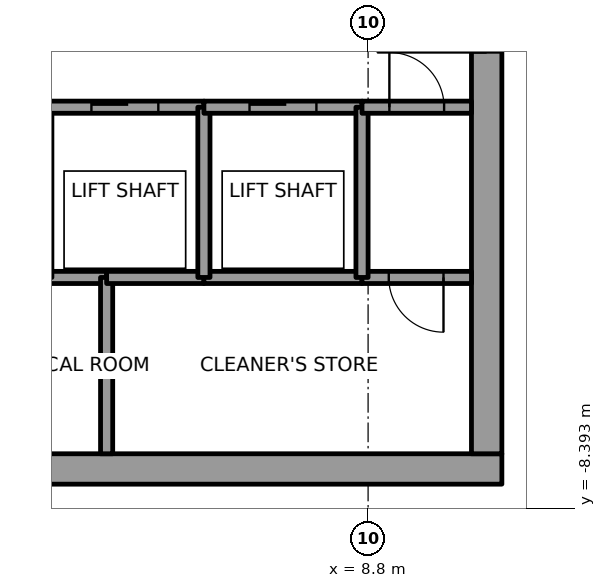
"""IFC4 building model, lengths in metres.
Left out: names, types, materials, properties, quantities, classifications, styles, units other than length and angle.
Written with IfcOpenShell. Run it as: python <this file> out.ifc"""

import sys

from ifc_helpers import new_model, si_unit, direction, frame, frame_2d, origin, place, context, subcontext, project, spatial, rectangle, extrude, element, fill, save


model = new_model("IFC4")
c1 = context("Model", 3, precision=1e-05, world=origin(), true_north=direction((0.0, 1.0)))
c2 = subcontext(c1, "Body", "Model", "MODEL_VIEW")
j1 = project(units=[si_unit("LENGTHUNIT", "METRE"), si_unit("PLANEANGLEUNIT", "RADIAN")], contexts=[c1])
p1 = place(None, origin())
s1 = spatial("IfcSite", under=j1, at=p1, CompositionType="ELEMENT")
p2 = place(p1, origin())
s2 = spatial("IfcBuilding", under=s1, at=p2, CompositionType="ELEMENT")
p3 = place(p2, frame((0.0, 0.0, 279.0)))
s3 = spatial("IfcBuildingStorey", under=s2, at=p3, CompositionType="ELEMENT", Elevation=279.0)
p4 = place(p3, frame((-11.0, -7.75, 0.0), z_axis=(0.0, 0.0, 1.0), x_axis=(1.0, 0.0, 0.0)))
e1 = element("IfcWall", 1, at=p4, inside=s3, PredefinedType="SHEAR", context=c2, shape_type="SweptSolid", body=[
    extrude(rectangle(XDim=22.0, YDim=0.5, at=frame_2d((11.0, 0.0))), origin(), (0.0, 0.0, 1.0), 4.0),
])
p5 = place(p4, frame((10.45, 0.0, 0.0)))
e2 = element("IfcOpeningElement", 2, at=p5, cuts=e1, PredefinedType="OPENING", context=c2, shape_type="SweptSolid", body=[
    extrude(rectangle(XDim=1.1, YDim=2.1, at=frame_2d((0.55, 1.05))), frame((0.0, 0.25, 0.0), z_axis=(0.0, -1.0, 0.0), x_axis=(1.0, 0.0, 0.0)), (0.0, 0.0, 1.0), 0.5),
])
p6 = place(p3, frame((10.75, -7.5, 0.0), z_axis=(0.0, 0.0, 1.0), x_axis=(0.0, 1.0, 0.0)))
e3 = element("IfcWall", 3, at=p6, inside=s3, PredefinedType="SHEAR", context=c2, shape_type="SweptSolid", body=[
    extrude(rectangle(XDim=15.0, YDim=0.5, at=frame_2d((7.5, 0.0))), origin(), (0.0, 0.0, 1.0), 4.0),
])
p7 = place(p6, frame((6.6, 0.0, 0.0)))
e4 = element("IfcOpeningElement", 4, at=p7, cuts=e3, PredefinedType="OPENING", context=c2, shape_type="SweptSolid", body=[
    extrude(rectangle(XDim=1.8, YDim=2.1, at=frame_2d((0.9, 1.05))), frame((0.0, 0.25, 0.0), z_axis=(0.0, -1.0, 0.0), x_axis=(1.0, 0.0, 0.0)), (0.0, 0.0, 1.0), 0.5),
])
p8 = place(p3, frame((4.5, -4.6, 0.0), z_axis=(0.0, 0.0, 1.0), x_axis=(-1.0, 0.0, 0.0)))
e5 = element("IfcWall", 5, at=p8, inside=s3, PredefinedType="SOLIDWALL", context=c2, shape_type="SweptSolid", body=[
    extrude(rectangle(XDim=1.0, YDim=0.2, at=frame_2d((0.5, 0.0))), origin(), (0.0, 0.0, 1.0), 3.85),
])
p9 = place(p3, frame((3.5, -1.8, 0.0), z_axis=(0.0, 0.0, 1.0), x_axis=(1.0, 0.0, 0.0)))
e6 = element("IfcWall", 6, at=p9, inside=s3, PredefinedType="SOLIDWALL", context=c2, shape_type="SweptSolid", body=[
    extrude(rectangle(XDim=2.6, YDim=0.2, at=frame_2d((1.3, 0.0))), origin(), (0.0, 0.0, 1.0), 3.85),
])
p10 = place(p9, frame((0.75, 0.0, 0.0)))
e7 = element("IfcOpeningElement", 7, at=p10, cuts=e6, PredefinedType="OPENING", context=c2, shape_type="SweptSolid", body=[
    extrude(rectangle(XDim=1.1, YDim=2.1, at=frame_2d((0.55, 1.05))), frame((0.0, 0.1, 0.0), z_axis=(0.0, -1.0, 0.0), x_axis=(1.0, 0.0, 0.0)), (0.0, 0.0, 1.0), 0.2),
])
p11 = place(p3, frame((4.5, -4.6, 0.0), z_axis=(0.0, 0.0, 1.0), x_axis=(0.0, -1.0, 0.0)))
e8 = element("IfcWall", 8, at=p11, inside=s3, PredefinedType="SOLIDWALL", context=c2, shape_type="SweptSolid", body=[
    extrude(rectangle(XDim=2.9, YDim=0.2, at=frame_2d((1.45, 0.0))), origin(), (0.0, 0.0, 1.0), 3.85),
])
p12 = place(p3, frame((6.1, -4.6, 0.0), z_axis=(0.0, 0.0, 1.0), x_axis=(-1.0, 0.0, 0.0)))
e9 = element("IfcWall", 9, at=p12, inside=s3, PredefinedType="SOLIDWALL", context=c2, shape_type="SweptSolid", body=[
    extrude(rectangle(XDim=1.6, YDim=0.2, at=frame_2d((0.8, 0.0))), origin(), (0.0, 0.0, 1.0), 3.85),
])
p13 = place(p3, frame((8.7, -4.6, 0.0), z_axis=(0.0, 0.0, 1.0), x_axis=(-1.0, 0.0, 0.0)))
e10 = element("IfcWall", 10, at=p13, inside=s3, PredefinedType="SOLIDWALL", context=c2, shape_type="SweptSolid", body=[
    extrude(rectangle(XDim=2.6, YDim=0.2, at=frame_2d((1.3, 0.0))), origin(), (0.0, 0.0, 1.0), 3.85),
])
p14 = place(p3, frame((6.1, -4.6, 0.0), z_axis=(0.0, 0.0, 1.0), x_axis=(0.0, 1.0, 0.0)))
e11 = element("IfcWall", 11, at=p14, inside=s3, PredefinedType="SOLIDWALL", context=c2, shape_type="SweptSolid", body=[
    extrude(rectangle(XDim=2.8, YDim=0.2, at=frame_2d((1.4, 0.0))), origin(), (0.0, 0.0, 1.0), 3.85),
])
p15 = place(p3, frame((6.1, -1.8, 0.0), z_axis=(0.0, 0.0, 1.0), x_axis=(1.0, 0.0, 0.0)))
e12 = element("IfcWall", 12, at=p15, inside=s3, PredefinedType="SOLIDWALL", context=c2, shape_type="SweptSolid", body=[
    extrude(rectangle(XDim=2.6, YDim=0.2, at=frame_2d((1.3, 0.0))), origin(), (0.0, 0.0, 1.0), 3.85),
])
p16 = place(p15, frame((0.75, 0.0, 0.0)))
e13 = element("IfcOpeningElement", 13, at=p16, cuts=e12, PredefinedType="OPENING", context=c2, shape_type="SweptSolid", body=[
    extrude(rectangle(XDim=1.1, YDim=2.1, at=frame_2d((0.55, 1.05))), frame((0.0, 0.1, 0.0), z_axis=(0.0, -1.0, 0.0), x_axis=(1.0, 0.0, 0.0)), (0.0, 0.0, 1.0), 0.2),
])
p17 = place(p3, frame((10.5, -4.6, 0.0), z_axis=(0.0, 0.0, 1.0), x_axis=(-1.0, 0.0, 0.0)))
e14 = element("IfcWall", 14, at=p17, inside=s3, PredefinedType="SOLIDWALL", context=c2, shape_type="SweptSolid", body=[
    extrude(rectangle(XDim=1.8, YDim=0.2, at=frame_2d((0.9, 0.0))), origin(), (0.0, 0.0, 1.0), 3.85),
])
p18 = place(p17, frame((0.46, 0.0, 0.0)))
e15 = element("IfcOpeningElement", 15, at=p18, cuts=e14, PredefinedType="OPENING", context=c2, shape_type="SweptSolid", body=[
    extrude(rectangle(XDim=0.9, YDim=2.1, at=frame_2d((0.45, 1.05))), frame((0.0, 0.1, 0.0), z_axis=(0.0, -1.0, 0.0), x_axis=(1.0, 0.0, 0.0)), (0.0, 0.0, 1.0), 0.2),
])
p19 = place(p3, frame((8.7, -1.8, 0.0), z_axis=(0.0, 0.0, 1.0), x_axis=(0.0, -1.0, 0.0)))
e16 = element("IfcWall", 16, at=p19, inside=s3, PredefinedType="SOLIDWALL", context=c2, shape_type="SweptSolid", body=[
    extrude(rectangle(XDim=2.8, YDim=0.2, at=frame_2d((1.4, 0.0))), origin(), (0.0, 0.0, 1.0), 3.85),
])
p20 = place(p3, frame((8.7, -1.8, 0.0), z_axis=(0.0, 0.0, 1.0), x_axis=(1.0, 0.0, 0.0)))
e17 = element("IfcWall", 17, at=p20, inside=s3, PredefinedType="SOLIDWALL", context=c2, shape_type="SweptSolid", body=[
    extrude(rectangle(XDim=1.8, YDim=0.2, at=frame_2d((0.9, 0.0))), origin(), (0.0, 0.0, 1.0), 3.85),
])
p21 = place(p20, frame((0.45, 0.0, 0.0)))
e18 = element("IfcOpeningElement", 18, at=p21, cuts=e17, PredefinedType="OPENING", context=c2, shape_type="SweptSolid", body=[
    extrude(rectangle(XDim=0.9, YDim=2.1, at=frame_2d((0.45, 1.05))), frame((0.0, 0.1, 0.0), z_axis=(0.0, -1.0, 0.0), x_axis=(1.0, 0.0, 0.0)), (0.0, 0.0, 1.0), 0.2),
])
p22 = place(p10, origin())
e19 = element("IfcDoor", 19, at=p22, inside=s3, OperationType="SLIDING_TO_RIGHT", PredefinedType="DOOR", context=c2, shape_type="SweptSolid", body=[
    extrude(rectangle(XDim=1.1, YDim=2.1, at=frame_2d((0.55, 1.05))), frame((0.0, 0.025, 0.0), z_axis=(0.0, -1.0, 0.0), x_axis=(1.0, 0.0, 0.0)), (0.0, 0.0, 1.0), 0.05),
])
fill(e7, e19)
p23 = place(p16, origin())
e20 = element("IfcDoor", 20, at=p23, inside=s3, OperationType="SLIDING_TO_LEFT", PredefinedType="DOOR", context=c2, shape_type="SweptSolid", body=[
    extrude(rectangle(XDim=1.1, YDim=2.1, at=frame_2d((0.55, 1.05))), frame((0.0, 0.025, 0.0), z_axis=(0.0, -1.0, 0.0), x_axis=(1.0, 0.0, 0.0)), (0.0, 0.0, 1.0), 0.05),
])
fill(e13, e20)
p24 = place(p18, origin())
e21 = element("IfcDoor", 21, at=p24, inside=s3, OperationType="SINGLE_SWING_RIGHT", PredefinedType="DOOR", context=c2, shape_type="SweptSolid", body=[
    extrude(rectangle(XDim=0.9, YDim=2.1, at=frame_2d((0.45, 1.05))), frame((0.0, 0.025, 0.0), z_axis=(0.0, -1.0, 0.0), x_axis=(1.0, 0.0, 0.0)), (0.0, 0.0, 1.0), 0.05),
])
fill(e15, e21)
p25 = place(p21, origin())
e22 = element("IfcDoor", 22, at=p25, inside=s3, OperationType="SINGLE_SWING_LEFT", PredefinedType="DOOR", context=c2, shape_type="SweptSolid", body=[
    extrude(rectangle(XDim=0.9, YDim=2.1, at=frame_2d((0.45, 1.05))), frame((0.0, 0.025, 0.0), z_axis=(0.0, -1.0, 0.0), x_axis=(1.0, 0.0, 0.0)), (0.0, 0.0, 1.0), 0.05),
])
fill(e18, e22)
p26 = place(p7, origin())
e23 = element("IfcDoor", 23, at=p26, inside=s3, OperationType="DOUBLE_DOOR_SINGLE_SWING", PredefinedType="DOOR", context=c2, shape_type="SweptSolid", body=[
    extrude(rectangle(XDim=1.8, YDim=2.1, at=frame_2d((0.9, 1.05))), frame((0.0, 0.025, 0.0), z_axis=(0.0, -1.0, 0.0), x_axis=(1.0, 0.0, 0.0)), (0.0, 0.0, 1.0), 0.05),
])
fill(e4, e23)
save(model, sys.argv[1])
